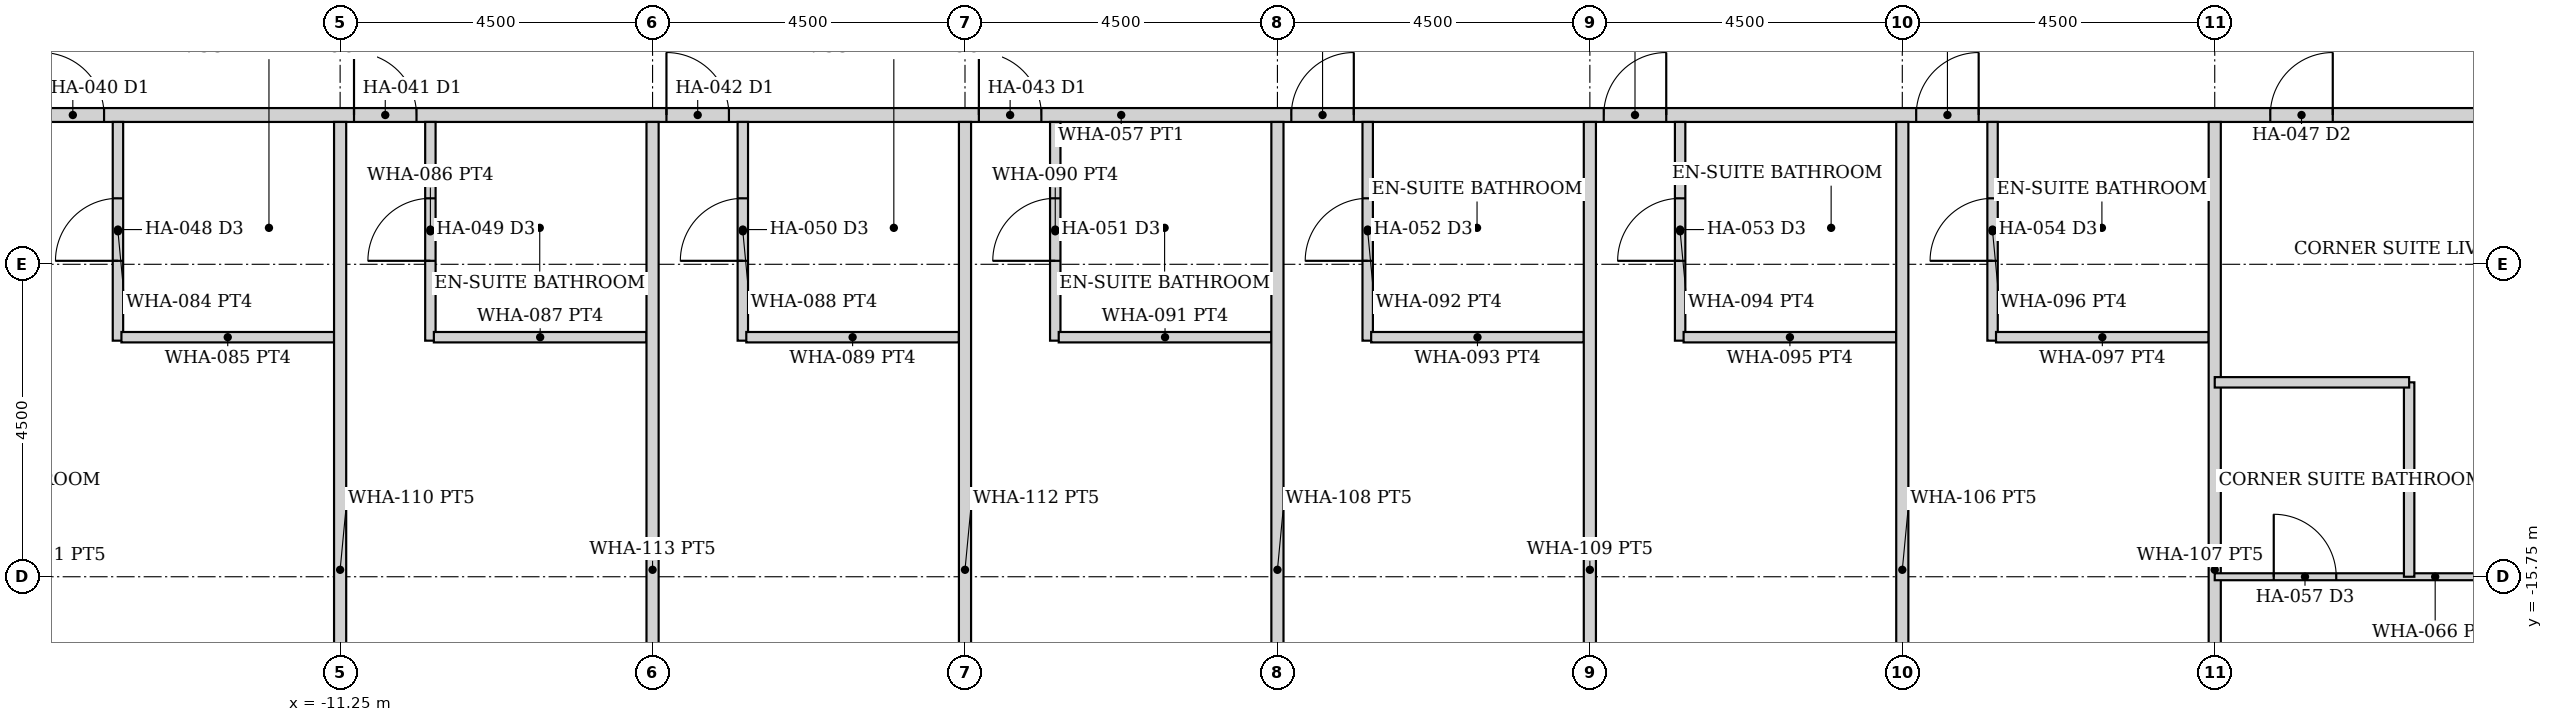
"""IFC4 building model, lengths in metres.
Left out: names, types, materials, properties, quantities, classifications, styles, units other than length and angle.
Written with IfcOpenShell. Run it as: python <this file> out.ifc"""

import sys

from ifc_helpers import new_model, si_unit, direction, frame, frame_2d, origin, place, context, subcontext, project, spatial, rectangle, extrude, element, fill, save


model = new_model("IFC4")
c1 = context("Model", 3, precision=1e-05, world=origin(), true_north=direction((0.0, 1.0)))
c2 = subcontext(c1, "Body", "Model", "MODEL_VIEW")
j1 = project(units=[si_unit("LENGTHUNIT", "METRE"), si_unit("PLANEANGLEUNIT", "RADIAN")], contexts=[c1])
p1 = place(None, origin())
s1 = spatial("IfcSite", under=j1, at=p1, CompositionType="ELEMENT")
p2 = place(p1, origin())
s2 = spatial("IfcBuilding", under=s1, at=p2, CompositionType="ELEMENT")
p3 = place(p2, frame((0.0, 0.0, 118.4)))
s3 = spatial("IfcBuildingStorey", under=s2, at=p3, CompositionType="ELEMENT", Elevation=118.4)
p4 = place(p3, frame((-22.3, -9.1, 0.0), z_axis=(0.0, 0.0, 1.0), x_axis=(1.0, 0.0, 0.0)))
e1 = element("IfcWall", 1, at=p4, inside=s3, PredefinedType="PARTITIONING", context=c2, shape_type="SweptSolid", body=[
    extrude(rectangle(XDim=44.6, YDim=0.2, at=frame_2d((22.3, 0.0))), origin(), (0.0, 0.0, 1.0), 2.473),
])
p5 = place(p4, frame((6.75, 0.0, 0.0)))
e2 = element("IfcOpeningElement", 2, at=p5, cuts=e1, PredefinedType="OPENING", context=c2, shape_type="SweptSolid", body=[
    extrude(rectangle(XDim=0.9, YDim=2.1, at=frame_2d((0.45, 1.05))), frame((0.0, 0.11, 0.0), z_axis=(0.0, -1.0, 0.0), x_axis=(1.0, 0.0, 0.0)), (0.0, 0.0, 1.0), 0.22),
])
p6 = place(p4, frame((11.25, 0.0, 0.0)))
e3 = element("IfcOpeningElement", 3, at=p6, cuts=e1, PredefinedType="OPENING", context=c2, shape_type="SweptSolid", body=[
    extrude(rectangle(XDim=0.9, YDim=2.1, at=frame_2d((0.45, 1.05))), frame((0.0, 0.11, 0.0), z_axis=(0.0, -1.0, 0.0), x_axis=(1.0, 0.0, 0.0)), (0.0, 0.0, 1.0), 0.22),
])
p7 = place(p4, frame((15.75, 0.0, 0.0)))
e4 = element("IfcOpeningElement", 4, at=p7, cuts=e1, PredefinedType="OPENING", context=c2, shape_type="SweptSolid", body=[
    extrude(rectangle(XDim=0.9, YDim=2.1, at=frame_2d((0.45, 1.05))), frame((0.0, 0.11, 0.0), z_axis=(0.0, -1.0, 0.0), x_axis=(1.0, 0.0, 0.0)), (0.0, 0.0, 1.0), 0.22),
])
p8 = place(p4, frame((20.25, 0.0, 0.0)))
e5 = element("IfcOpeningElement", 5, at=p8, cuts=e1, PredefinedType="OPENING", context=c2, shape_type="SweptSolid", body=[
    extrude(rectangle(XDim=0.9, YDim=2.1, at=frame_2d((0.45, 1.05))), frame((0.0, 0.11, 0.0), z_axis=(0.0, -1.0, 0.0), x_axis=(1.0, 0.0, 0.0)), (0.0, 0.0, 1.0), 0.22),
])
p9 = place(p4, frame((24.75, 0.0, 0.0)))
e6 = element("IfcOpeningElement", 6, at=p9, cuts=e1, PredefinedType="OPENING", context=c2, shape_type="SweptSolid", body=[
    extrude(rectangle(XDim=0.9, YDim=2.1, at=frame_2d((0.45, 1.05))), frame((0.0, 0.11, 0.0), z_axis=(0.0, -1.0, 0.0), x_axis=(1.0, 0.0, 0.0)), (0.0, 0.0, 1.0), 0.22),
])
p10 = place(p4, frame((29.25, 0.0, 0.0)))
e7 = element("IfcOpeningElement", 7, at=p10, cuts=e1, PredefinedType="OPENING", context=c2, shape_type="SweptSolid", body=[
    extrude(rectangle(XDim=0.9, YDim=2.1, at=frame_2d((0.45, 1.05))), frame((0.0, 0.11, 0.0), z_axis=(0.0, -1.0, 0.0), x_axis=(1.0, 0.0, 0.0)), (0.0, 0.0, 1.0), 0.22),
])
p11 = place(p4, frame((33.75, 0.0, 0.0)))
e8 = element("IfcOpeningElement", 8, at=p11, cuts=e1, PredefinedType="OPENING", context=c2, shape_type="SweptSolid", body=[
    extrude(rectangle(XDim=0.9, YDim=2.1, at=frame_2d((0.45, 1.05))), frame((0.0, 0.11, 0.0), z_axis=(0.0, -1.0, 0.0), x_axis=(1.0, 0.0, 0.0)), (0.0, 0.0, 1.0), 0.22),
])
p12 = place(p4, frame((38.85, 0.0, 0.0)))
e9 = element("IfcOpeningElement", 9, at=p12, cuts=e1, PredefinedType="OPENING", context=c2, shape_type="SweptSolid", body=[
    extrude(rectangle(XDim=0.9, YDim=2.1, at=frame_2d((0.45, 1.05))), frame((0.0, 0.11, 0.0), z_axis=(0.0, -1.0, 0.0), x_axis=(1.0, 0.0, 0.0)), (0.0, 0.0, 1.0), 0.22),
])
p13 = place(p4, frame((4.85, 0.0, 0.0)))
e10 = element("IfcOpeningElement", 10, at=p13, cuts=e1, PredefinedType="OPENING", context=c2, shape_type="SweptSolid", body=[
    extrude(rectangle(XDim=0.9, YDim=2.1, at=frame_2d((0.45, 1.05))), frame((0.0, 0.11, 0.0), z_axis=(0.0, -1.0, 0.0), x_axis=(1.0, 0.0, 0.0)), (0.0, 0.0, 1.0), 0.22),
])
p14 = place(p3, frame((-14.45, -12.35, 0.0), z_axis=(0.0, 0.0, 1.0), x_axis=(0.0, 1.0, 0.0)))
e11 = element("IfcWall", 11, at=p14, inside=s3, PredefinedType="PARTITIONING", context=c2, shape_type="SweptSolid", body=[
    extrude(rectangle(XDim=3.15, YDim=0.15, at=frame_2d((1.575, 0.0))), origin(), (0.0, 0.0, 1.0), 2.473),
])
p15 = place(p14, frame((1.15, 0.0, 0.0)))
e12 = element("IfcOpeningElement", 12, at=p15, cuts=e11, PredefinedType="OPENING", context=c2, shape_type="SweptSolid", body=[
    extrude(rectangle(XDim=0.9, YDim=2.1, at=frame_2d((0.45, 1.05))), frame((0.0, 0.085, 0.0), z_axis=(0.0, -1.0, 0.0), x_axis=(1.0, 0.0, 0.0)), (0.0, 0.0, 1.0), 0.17),
])
p16 = place(p3, frame((-14.4, -12.3, 0.0), z_axis=(0.0, 0.0, 1.0), x_axis=(1.0, 0.0, 0.0)))
e13 = element("IfcWall", 13, at=p16, inside=s3, PredefinedType="PARTITIONING", context=c2, shape_type="SweptSolid", body=[
    extrude(rectangle(XDim=3.062, YDim=0.15, at=frame_2d((1.531, 0.0))), origin(), (0.0, 0.0, 1.0), 2.473),
])
p17 = place(p3, frame((-9.95, -12.35, 0.0), z_axis=(0.0, 0.0, 1.0), x_axis=(0.0, 1.0, 0.0)))
e14 = element("IfcWall", 14, at=p17, inside=s3, PredefinedType="PARTITIONING", context=c2, shape_type="SweptSolid", body=[
    extrude(rectangle(XDim=3.15, YDim=0.15, at=frame_2d((1.575, 0.0))), origin(), (0.0, 0.0, 1.0), 2.473),
])
p18 = place(p17, frame((1.15, 0.0, 0.0)))
e15 = element("IfcOpeningElement", 15, at=p18, cuts=e14, PredefinedType="OPENING", context=c2, shape_type="SweptSolid", body=[
    extrude(rectangle(XDim=0.9, YDim=2.1, at=frame_2d((0.45, 1.05))), frame((0.0, 0.085, 0.0), z_axis=(0.0, -1.0, 0.0), x_axis=(1.0, 0.0, 0.0)), (0.0, 0.0, 1.0), 0.17),
])
p19 = place(p3, frame((-9.9, -12.3, 0.0), z_axis=(0.0, 0.0, 1.0), x_axis=(1.0, 0.0, 0.0)))
e16 = element("IfcWall", 16, at=p19, inside=s3, PredefinedType="PARTITIONING", context=c2, shape_type="SweptSolid", body=[
    extrude(rectangle(XDim=3.062, YDim=0.15, at=frame_2d((1.531, 0.0))), origin(), (0.0, 0.0, 1.0), 2.473),
])
p20 = place(p3, frame((-5.45, -12.35, 0.0), z_axis=(0.0, 0.0, 1.0), x_axis=(0.0, 1.0, 0.0)))
e17 = element("IfcWall", 17, at=p20, inside=s3, PredefinedType="PARTITIONING", context=c2, shape_type="SweptSolid", body=[
    extrude(rectangle(XDim=3.15, YDim=0.15, at=frame_2d((1.575, 0.0))), origin(), (0.0, 0.0, 1.0), 2.473),
])
p21 = place(p20, frame((1.15, 0.0, 0.0)))
e18 = element("IfcOpeningElement", 18, at=p21, cuts=e17, PredefinedType="OPENING", context=c2, shape_type="SweptSolid", body=[
    extrude(rectangle(XDim=0.9, YDim=2.1, at=frame_2d((0.45, 1.05))), frame((0.0, 0.085, 0.0), z_axis=(0.0, -1.0, 0.0), x_axis=(1.0, 0.0, 0.0)), (0.0, 0.0, 1.0), 0.17),
])
p22 = place(p3, frame((-5.4, -12.3, 0.0), z_axis=(0.0, 0.0, 1.0), x_axis=(1.0, 0.0, 0.0)))
e19 = element("IfcWall", 19, at=p22, inside=s3, PredefinedType="PARTITIONING", context=c2, shape_type="SweptSolid", body=[
    extrude(rectangle(XDim=3.062, YDim=0.15, at=frame_2d((1.531, 0.0))), origin(), (0.0, 0.0, 1.0), 2.473),
])
p23 = place(p3, frame((-0.95, -12.35, 0.0), z_axis=(0.0, 0.0, 1.0), x_axis=(0.0, 1.0, 0.0)))
e20 = element("IfcWall", 20, at=p23, inside=s3, PredefinedType="PARTITIONING", context=c2, shape_type="SweptSolid", body=[
    extrude(rectangle(XDim=3.15, YDim=0.15, at=frame_2d((1.575, 0.0))), origin(), (0.0, 0.0, 1.0), 2.473),
])
p24 = place(p23, frame((1.15, 0.0, 0.0)))
e21 = element("IfcOpeningElement", 21, at=p24, cuts=e20, PredefinedType="OPENING", context=c2, shape_type="SweptSolid", body=[
    extrude(rectangle(XDim=0.9, YDim=2.1, at=frame_2d((0.45, 1.05))), frame((0.0, 0.085, 0.0), z_axis=(0.0, -1.0, 0.0), x_axis=(1.0, 0.0, 0.0)), (0.0, 0.0, 1.0), 0.17),
])
p25 = place(p3, frame((-0.9, -12.3, 0.0), z_axis=(0.0, 0.0, 1.0), x_axis=(1.0, 0.0, 0.0)))
e22 = element("IfcWall", 22, at=p25, inside=s3, PredefinedType="PARTITIONING", context=c2, shape_type="SweptSolid", body=[
    extrude(rectangle(XDim=3.062, YDim=0.15, at=frame_2d((1.531, 0.0))), origin(), (0.0, 0.0, 1.0), 2.473),
])
p26 = place(p3, frame((3.55, -12.35, 0.0), z_axis=(0.0, 0.0, 1.0), x_axis=(0.0, 1.0, 0.0)))
e23 = element("IfcWall", 23, at=p26, inside=s3, PredefinedType="PARTITIONING", context=c2, shape_type="SweptSolid", body=[
    extrude(rectangle(XDim=3.15, YDim=0.15, at=frame_2d((1.575, 0.0))), origin(), (0.0, 0.0, 1.0), 2.473),
])
p27 = place(p26, frame((1.15, 0.0, 0.0)))
e24 = element("IfcOpeningElement", 24, at=p27, cuts=e23, PredefinedType="OPENING", context=c2, shape_type="SweptSolid", body=[
    extrude(rectangle(XDim=0.9, YDim=2.1, at=frame_2d((0.45, 1.05))), frame((0.0, 0.085, 0.0), z_axis=(0.0, -1.0, 0.0), x_axis=(1.0, 0.0, 0.0)), (0.0, 0.0, 1.0), 0.17),
])
p28 = place(p3, frame((3.6, -12.3, 0.0), z_axis=(0.0, 0.0, 1.0), x_axis=(1.0, 0.0, 0.0)))
e25 = element("IfcWall", 25, at=p28, inside=s3, PredefinedType="PARTITIONING", context=c2, shape_type="SweptSolid", body=[
    extrude(rectangle(XDim=3.062, YDim=0.15, at=frame_2d((1.531, 0.0))), origin(), (0.0, 0.0, 1.0), 2.473),
])
p29 = place(p3, frame((8.05, -12.35, 0.0), z_axis=(0.0, 0.0, 1.0), x_axis=(0.0, 1.0, 0.0)))
e26 = element("IfcWall", 26, at=p29, inside=s3, PredefinedType="PARTITIONING", context=c2, shape_type="SweptSolid", body=[
    extrude(rectangle(XDim=3.15, YDim=0.15, at=frame_2d((1.575, 0.0))), origin(), (0.0, 0.0, 1.0), 2.473),
])
p30 = place(p29, frame((1.15, 0.0, 0.0)))
e27 = element("IfcOpeningElement", 27, at=p30, cuts=e26, PredefinedType="OPENING", context=c2, shape_type="SweptSolid", body=[
    extrude(rectangle(XDim=0.9, YDim=2.1, at=frame_2d((0.45, 1.05))), frame((0.0, 0.085, 0.0), z_axis=(0.0, -1.0, 0.0), x_axis=(1.0, 0.0, 0.0)), (0.0, 0.0, 1.0), 0.17),
])
p31 = place(p3, frame((8.1, -12.3, 0.0), z_axis=(0.0, 0.0, 1.0), x_axis=(1.0, 0.0, 0.0)))
e28 = element("IfcWall", 28, at=p31, inside=s3, PredefinedType="PARTITIONING", context=c2, shape_type="SweptSolid", body=[
    extrude(rectangle(XDim=3.062, YDim=0.15, at=frame_2d((1.531, 0.0))), origin(), (0.0, 0.0, 1.0), 2.473),
])
p32 = place(p3, frame((12.55, -12.35, 0.0), z_axis=(0.0, 0.0, 1.0), x_axis=(0.0, 1.0, 0.0)))
e29 = element("IfcWall", 29, at=p32, inside=s3, PredefinedType="PARTITIONING", context=c2, shape_type="SweptSolid", body=[
    extrude(rectangle(XDim=3.15, YDim=0.15, at=frame_2d((1.575, 0.0))), origin(), (0.0, 0.0, 1.0), 2.473),
])
p33 = place(p32, frame((1.15, 0.0, 0.0)))
e30 = element("IfcOpeningElement", 30, at=p33, cuts=e29, PredefinedType="OPENING", context=c2, shape_type="SweptSolid", body=[
    extrude(rectangle(XDim=0.9, YDim=2.1, at=frame_2d((0.45, 1.05))), frame((0.0, 0.085, 0.0), z_axis=(0.0, -1.0, 0.0), x_axis=(1.0, 0.0, 0.0)), (0.0, 0.0, 1.0), 0.17),
])
p34 = place(p3, frame((12.6, -12.3, 0.0), z_axis=(0.0, 0.0, 1.0), x_axis=(1.0, 0.0, 0.0)))
e31 = element("IfcWall", 31, at=p34, inside=s3, PredefinedType="PARTITIONING", context=c2, shape_type="SweptSolid", body=[
    extrude(rectangle(XDim=3.062, YDim=0.15, at=frame_2d((1.531, 0.0))), origin(), (0.0, 0.0, 1.0), 2.473),
])
for number, where, z_axis, x_axis in (
    (32, (-11.25, -22.1, 0.0), (0.0, 0.0, 1.0), (0.0, 1.0, 0.0)),
    (33, (-6.75, -22.1, 0.0), (0.0, 0.0, 1.0), (0.0, 1.0, 0.0)),
    (34, (-2.25, -22.1, 0.0), (0.0, 0.0, 1.0), (0.0, 1.0, 0.0)),
    (35, (2.25, -22.1, 0.0), (0.0, 0.0, 1.0), (0.0, 1.0, 0.0)),
    (36, (6.75, -22.1, 0.0), (0.0, 0.0, 1.0), (0.0, 1.0, 0.0)),
    (37, (11.25, -22.1, 0.0), (0.0, 0.0, 1.0), (0.0, 1.0, 0.0)),
    (38, (15.75, -22.1, 0.0), (0.0, 0.0, 1.0), (0.0, 1.0, 0.0)),
):
    element("IfcWall", number, at=place(p3, frame(where, z_axis=z_axis, x_axis=x_axis)), inside=s3, PredefinedType="PARTITIONING", context=c2, shape_type="SweptSolid", body=[
        extrude(rectangle(XDim=12.9, YDim=0.175, at=frame_2d((6.45, 0.0))), origin(), (0.0, 0.0, 1.0), 2.473),
    ])
p35 = place(p3, frame((15.75, -15.75, 0.0), z_axis=(0.0, 0.0, 1.0), x_axis=(1.0, 0.0, 0.0)))
e39 = element("IfcWall", 39, at=p35, inside=s3, PredefinedType="PARTITIONING", context=c2, shape_type="SweptSolid", body=[
    extrude(rectangle(XDim=6.35, YDim=0.1, at=frame_2d((3.175, 0.0))), origin(), (0.0, 0.0, 1.0), 2.473),
])
p36 = place(p35, frame((4.125, 0.0, 0.0)))
e40 = element("IfcOpeningElement", 40, at=p36, cuts=e39, PredefinedType="OPENING", context=c2, shape_type="SweptSolid", body=[
    extrude(rectangle(XDim=0.85, YDim=2.1, at=frame_2d((0.425, 1.05))), frame((0.0, 0.06, 0.0), z_axis=(0.0, -1.0, 0.0), x_axis=(1.0, 0.0, 0.0)), (0.0, 0.0, 1.0), 0.12),
])
p37 = place(p35, frame((0.85, 0.0, 0.0)))
e41 = element("IfcOpeningElement", 41, at=p37, cuts=e39, PredefinedType="OPENING", context=c2, shape_type="SweptSolid", body=[
    extrude(rectangle(XDim=0.9, YDim=2.1, at=frame_2d((0.45, 1.05))), frame((0.0, 0.06, 0.0), z_axis=(0.0, -1.0, 0.0), x_axis=(1.0, 0.0, 0.0)), (0.0, 0.0, 1.0), 0.12),
])
for number, where, z_axis, x_axis in (
    (42, (18.55, -15.75, 0.0), (0.0, 0.0, 1.0), (0.0, 1.0, 0.0)),
    (43, (15.75, -12.95, 0.0), (0.0, 0.0, 1.0), (1.0, 0.0, 0.0)),
):
    element("IfcWall", number, at=place(p3, frame(where, z_axis=z_axis, x_axis=x_axis)), inside=s3, PredefinedType="PARTITIONING", context=c2, shape_type="SweptSolid", body=[
        extrude(rectangle(XDim=2.8, YDim=0.15, at=frame_2d((1.4, 0.0))), origin(), (0.0, 0.0, 1.0), 2.473),
    ])
p38 = place(p5, origin())
e44 = element("IfcDoor", 44, at=p38, inside=s3, OperationType="SINGLE_SWING_LEFT", PredefinedType="DOOR", context=c2, shape_type="SweptSolid", body=[
    extrude(rectangle(XDim=0.9, YDim=2.1, at=frame_2d((0.45, 1.05))), frame((0.0, 0.025, 0.0), z_axis=(0.0, -1.0, 0.0), x_axis=(1.0, 0.0, 0.0)), (0.0, 0.0, 1.0), 0.05),
])
fill(e2, e44)
p39 = place(p15, origin())
e45 = element("IfcDoor", 45, at=p39, inside=s3, OperationType="SINGLE_SWING_LEFT", PredefinedType="DOOR", context=c2, shape_type="SweptSolid", body=[
    extrude(rectangle(XDim=0.9, YDim=2.1, at=frame_2d((0.45, 1.05))), frame((0.0, 0.025, 0.0), z_axis=(0.0, -1.0, 0.0), x_axis=(1.0, 0.0, 0.0)), (0.0, 0.0, 1.0), 0.05),
])
fill(e12, e45)
p40 = place(p6, origin())
e46 = element("IfcDoor", 46, at=p40, inside=s3, OperationType="SINGLE_SWING_LEFT", PredefinedType="DOOR", context=c2, shape_type="SweptSolid", body=[
    extrude(rectangle(XDim=0.9, YDim=2.1, at=frame_2d((0.45, 1.05))), frame((0.0, 0.025, 0.0), z_axis=(0.0, -1.0, 0.0), x_axis=(1.0, 0.0, 0.0)), (0.0, 0.0, 1.0), 0.05),
])
fill(e3, e46)
p41 = place(p18, origin())
e47 = element("IfcDoor", 47, at=p41, inside=s3, OperationType="SINGLE_SWING_LEFT", PredefinedType="DOOR", context=c2, shape_type="SweptSolid", body=[
    extrude(rectangle(XDim=0.9, YDim=2.1, at=frame_2d((0.45, 1.05))), frame((0.0, 0.025, 0.0), z_axis=(0.0, -1.0, 0.0), x_axis=(1.0, 0.0, 0.0)), (0.0, 0.0, 1.0), 0.05),
])
fill(e15, e47)
p42 = place(p7, origin())
e48 = element("IfcDoor", 48, at=p42, inside=s3, OperationType="SINGLE_SWING_LEFT", PredefinedType="DOOR", context=c2, shape_type="SweptSolid", body=[
    extrude(rectangle(XDim=0.9, YDim=2.1, at=frame_2d((0.45, 1.05))), frame((0.0, 0.025, 0.0), z_axis=(0.0, -1.0, 0.0), x_axis=(1.0, 0.0, 0.0)), (0.0, 0.0, 1.0), 0.05),
])
fill(e4, e48)
p43 = place(p21, origin())
e49 = element("IfcDoor", 49, at=p43, inside=s3, OperationType="SINGLE_SWING_LEFT", PredefinedType="DOOR", context=c2, shape_type="SweptSolid", body=[
    extrude(rectangle(XDim=0.9, YDim=2.1, at=frame_2d((0.45, 1.05))), frame((0.0, 0.025, 0.0), z_axis=(0.0, -1.0, 0.0), x_axis=(1.0, 0.0, 0.0)), (0.0, 0.0, 1.0), 0.05),
])
fill(e18, e49)
p44 = place(p8, origin())
e50 = element("IfcDoor", 50, at=p44, inside=s3, OperationType="SINGLE_SWING_LEFT", PredefinedType="DOOR", context=c2, shape_type="SweptSolid", body=[
    extrude(rectangle(XDim=0.9, YDim=2.1, at=frame_2d((0.45, 1.05))), frame((0.0, 0.025, 0.0), z_axis=(0.0, -1.0, 0.0), x_axis=(1.0, 0.0, 0.0)), (0.0, 0.0, 1.0), 0.05),
])
fill(e5, e50)
p45 = place(p24, origin())
e51 = element("IfcDoor", 51, at=p45, inside=s3, OperationType="SINGLE_SWING_LEFT", PredefinedType="DOOR", context=c2, shape_type="SweptSolid", body=[
    extrude(rectangle(XDim=0.9, YDim=2.1, at=frame_2d((0.45, 1.05))), frame((0.0, 0.025, 0.0), z_axis=(0.0, -1.0, 0.0), x_axis=(1.0, 0.0, 0.0)), (0.0, 0.0, 1.0), 0.05),
])
fill(e21, e51)
p46 = place(p9, origin())
e52 = element("IfcDoor", 52, at=p46, inside=s3, OperationType="SINGLE_SWING_RIGHT", PredefinedType="DOOR", context=c2, shape_type="SweptSolid", body=[
    extrude(rectangle(XDim=0.9, YDim=2.1, at=frame_2d((0.45, 1.05))), frame((0.0, 0.025, 0.0), z_axis=(0.0, -1.0, 0.0), x_axis=(1.0, 0.0, 0.0)), (0.0, 0.0, 1.0), 0.05),
])
fill(e6, e52)
p47 = place(p27, origin())
e53 = element("IfcDoor", 53, at=p47, inside=s3, OperationType="SINGLE_SWING_LEFT", PredefinedType="DOOR", context=c2, shape_type="SweptSolid", body=[
    extrude(rectangle(XDim=0.9, YDim=2.1, at=frame_2d((0.45, 1.05))), frame((0.0, 0.025, 0.0), z_axis=(0.0, -1.0, 0.0), x_axis=(1.0, 0.0, 0.0)), (0.0, 0.0, 1.0), 0.05),
])
fill(e24, e53)
p48 = place(p10, origin())
e54 = element("IfcDoor", 54, at=p48, inside=s3, OperationType="SINGLE_SWING_RIGHT", PredefinedType="DOOR", context=c2, shape_type="SweptSolid", body=[
    extrude(rectangle(XDim=0.9, YDim=2.1, at=frame_2d((0.45, 1.05))), frame((0.0, 0.025, 0.0), z_axis=(0.0, -1.0, 0.0), x_axis=(1.0, 0.0, 0.0)), (0.0, 0.0, 1.0), 0.05),
])
fill(e7, e54)
p49 = place(p30, origin())
e55 = element("IfcDoor", 55, at=p49, inside=s3, OperationType="SINGLE_SWING_LEFT", PredefinedType="DOOR", context=c2, shape_type="SweptSolid", body=[
    extrude(rectangle(XDim=0.9, YDim=2.1, at=frame_2d((0.45, 1.05))), frame((0.0, 0.025, 0.0), z_axis=(0.0, -1.0, 0.0), x_axis=(1.0, 0.0, 0.0)), (0.0, 0.0, 1.0), 0.05),
])
fill(e27, e55)
p50 = place(p11, origin())
e56 = element("IfcDoor", 56, at=p50, inside=s3, OperationType="SINGLE_SWING_RIGHT", PredefinedType="DOOR", context=c2, shape_type="SweptSolid", body=[
    extrude(rectangle(XDim=0.9, YDim=2.1, at=frame_2d((0.45, 1.05))), frame((0.0, 0.025, 0.0), z_axis=(0.0, -1.0, 0.0), x_axis=(1.0, 0.0, 0.0)), (0.0, 0.0, 1.0), 0.05),
])
fill(e8, e56)
p51 = place(p33, origin())
e57 = element("IfcDoor", 57, at=p51, inside=s3, OperationType="SINGLE_SWING_LEFT", PredefinedType="DOOR", context=c2, shape_type="SweptSolid", body=[
    extrude(rectangle(XDim=0.9, YDim=2.1, at=frame_2d((0.45, 1.05))), frame((0.0, 0.025, 0.0), z_axis=(0.0, -1.0, 0.0), x_axis=(1.0, 0.0, 0.0)), (0.0, 0.0, 1.0), 0.05),
])
fill(e30, e57)
p52 = place(p12, origin())
e58 = element("IfcDoor", 58, at=p52, inside=s3, OperationType="SINGLE_SWING_RIGHT", PredefinedType="DOOR", context=c2, shape_type="SweptSolid", body=[
    extrude(rectangle(XDim=0.9, YDim=2.1, at=frame_2d((0.45, 1.05))), frame((0.0, 0.025, 0.0), z_axis=(0.0, -1.0, 0.0), x_axis=(1.0, 0.0, 0.0)), (0.0, 0.0, 1.0), 0.05),
])
fill(e9, e58)
p53 = place(p37, origin())
e59 = element("IfcDoor", 59, at=p53, inside=s3, OperationType="SINGLE_SWING_LEFT", PredefinedType="DOOR", context=c2, shape_type="SweptSolid", body=[
    extrude(rectangle(XDim=0.9, YDim=2.1, at=frame_2d((0.45, 1.05))), frame((0.0, 0.025, 0.0), z_axis=(0.0, -1.0, 0.0), x_axis=(1.0, 0.0, 0.0)), (0.0, 0.0, 1.0), 0.05),
])
fill(e41, e59)
save(model, sys.argv[1])
